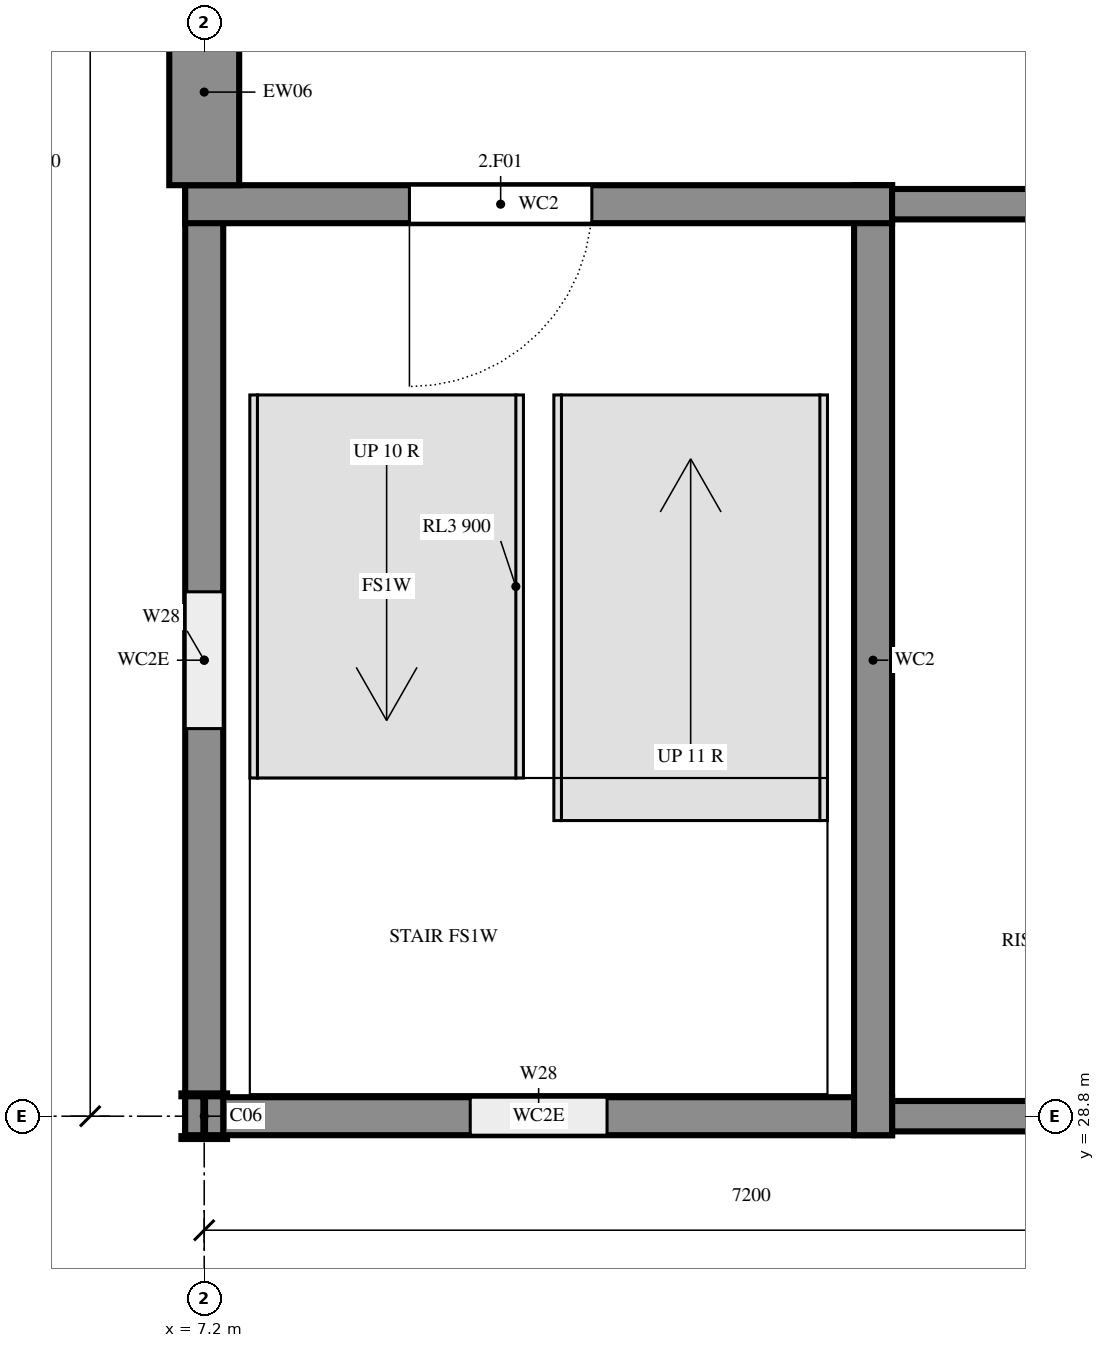
"""IFC4 building model, lengths in metres.
Left out: names, types, materials, properties, quantities, classifications, styles, units other than length and angle.
Written with IfcOpenShell. Run it as: python <this file> out.ifc"""

import sys

from ifc_helpers import new_model, si_unit, direction, frame, frame_2d, origin, origin_2d, place, context, subcontext, project, spatial, rectangle, i_section, extrude, element, fill, save


model = new_model("IFC4")
c1 = context("Model", 3, precision=1e-05, world=origin(), true_north=direction((0.0, 1.0)))
c2 = subcontext(c1, "Body", "Model", "MODEL_VIEW")
j1 = project(units=[si_unit("LENGTHUNIT", "METRE"), si_unit("PLANEANGLEUNIT", "RADIAN")], contexts=[c1])
p1 = place(None, origin())
s1 = spatial("IfcSite", under=j1, at=p1, CompositionType="ELEMENT")
p2 = place(p1, origin())
s2 = spatial("IfcBuilding", under=s1, at=p2, CompositionType="ELEMENT")
p3 = place(p2, frame((0.0, 0.0, 7.2)))
s3 = spatial("IfcBuildingStorey", under=s2, at=p3, CompositionType="ELEMENT", Elevation=7.2)
p4 = place(p3, frame((7.2, 28.8, 0.0), z_axis=(0.0, 0.0, 1.0), x_axis=(1.0, 0.0, 0.0)))
e1 = element("IfcColumn", 1, at=p4, inside=s3, PredefinedType="COLUMN", context=c2, shape_type="SweptSolid", body=[
    extrude(i_section(OverallWidth=0.3, OverallDepth=0.3, WebThickness=0.011, FlangeThickness=0.019, FilletRadius=0.027, at=origin_2d()), origin(), (0.0, 0.0, 1.0), 3.6),
])
p5 = place(p3, frame((7.075, 28.8, 0.0), z_axis=(0.0, 0.0, 1.0), x_axis=(1.0, 0.0, 0.0)))
e2 = element("IfcWall", 2, at=p5, inside=s3, PredefinedType="SHEAR", context=c2, shape_type="SweptSolid", body=[
    extrude(rectangle(XDim=4.65, YDim=0.25, at=frame_2d((2.325, 0.0))), origin(), (0.0, 0.0, 1.0), 3.6),
])
p6 = place(p5, frame((1.875, 0.0, 0.6)))
e3 = element("IfcOpeningElement", 3, at=p6, cuts=e2, PredefinedType="OPENING", context=c2, shape_type="SweptSolid", body=[
    extrude(rectangle(XDim=0.9, YDim=2.1, at=frame_2d((0.45, 1.05))), frame((0.0, 0.135, 0.0), z_axis=(0.0, -1.0, 0.0), x_axis=(1.0, 0.0, 0.0)), (0.0, 0.0, 1.0), 0.27),
])
p7 = place(p3, frame((11.725, 28.8, 0.0), z_axis=(0.0, 0.0, 1.0), x_axis=(1.0, 0.0, 0.0)))
e4 = element("IfcWall", 4, at=p7, inside=s3, PredefinedType="SHEAR", context=c2, shape_type="SweptSolid", body=[
    extrude(rectangle(XDim=2.775, YDim=0.2, at=frame_2d((1.387, 0.0))), origin(), (0.0, 0.0, 1.0), 3.6),
])
p8 = place(p3, frame((11.6, 28.675, 0.0), z_axis=(0.0, 0.0, 1.0), x_axis=(0.0, 1.0, 0.0)))
e5 = element("IfcWall", 5, at=p8, inside=s3, PredefinedType="SHEAR", context=c2, shape_type="SweptSolid", body=[
    extrude(rectangle(XDim=6.25, YDim=0.25, at=frame_2d((3.125, 0.0))), origin(), (0.0, 0.0, 1.0), 3.6),
])
p9 = place(p3, frame((7.2, 34.925, 0.0), z_axis=(0.0, 0.0, 1.0), x_axis=(0.0, -1.0, 0.0)))
e6 = element("IfcWall", 6, at=p9, inside=s3, PredefinedType="SHEAR", context=c2, shape_type="SweptSolid", body=[
    extrude(rectangle(XDim=6.25, YDim=0.25, at=frame_2d((3.125, 0.0))), origin(), (0.0, 0.0, 1.0), 3.6),
])
p10 = place(p9, frame((2.675, 0.0, 0.6)))
e7 = element("IfcOpeningElement", 7, at=p10, cuts=e6, PredefinedType="OPENING", context=c2, shape_type="SweptSolid", body=[
    extrude(rectangle(XDim=0.9, YDim=2.1, at=frame_2d((0.45, 1.05))), frame((0.0, 0.135, 0.0), z_axis=(0.0, -1.0, 0.0), x_axis=(1.0, 0.0, 0.0)), (0.0, 0.0, 1.0), 0.27),
])
p11 = place(p3, frame((11.725, 34.8, 0.0), z_axis=(0.0, 0.0, 1.0), x_axis=(-1.0, 0.0, 0.0)))
e8 = element("IfcWall", 8, at=p11, inside=s3, PredefinedType="SHEAR", context=c2, shape_type="SweptSolid", body=[
    extrude(rectangle(XDim=4.65, YDim=0.25, at=frame_2d((2.325, 0.0))), origin(), (0.0, 0.0, 1.0), 3.6),
])
p12 = place(p11, frame((1.975, 0.0, 0.0)))
e9 = element("IfcOpeningElement", 9, at=p12, cuts=e8, PredefinedType="OPENING", context=c2, shape_type="SweptSolid", body=[
    extrude(rectangle(XDim=1.2, YDim=2.4, at=frame_2d((0.6, 1.2))), frame((0.0, 0.135, 0.0), z_axis=(0.0, -1.0, 0.0), x_axis=(1.0, 0.0, 0.0)), (0.0, 0.0, 1.0), 0.27),
])
p13 = place(p3, frame((14.5, 34.8, 0.0), z_axis=(0.0, 0.0, 1.0), x_axis=(-1.0, 0.0, 0.0)))
e10 = element("IfcWall", 10, at=p13, inside=s3, PredefinedType="SHEAR", context=c2, shape_type="SweptSolid", body=[
    extrude(rectangle(XDim=2.775, YDim=0.2, at=frame_2d((1.387, 0.0))), origin(), (0.0, 0.0, 1.0), 3.6),
])
p14 = place(p3, frame((7.2, 36.15, 0.0), z_axis=(0.0, 0.0, 1.0), x_axis=(0.0, -1.0, 0.0)))
e11 = element("IfcWall", 11, at=p14, inside=s3, PredefinedType="SOLIDWALL", context=c2, shape_type="SweptSolid", body=[
    extrude(rectangle(XDim=1.225, YDim=0.46, at=frame_2d((0.612, 0.0))), origin(), (0.0, 0.0, 1.0), 3.22),
])
p15 = place(p6, origin())
e12 = element("IfcWindow", 12, at=p15, inside=s3, PartitioningType="SINGLE_PANEL", PredefinedType="WINDOW", context=c2, shape_type="SweptSolid", body=[
    extrude(rectangle(XDim=0.9, YDim=2.1, at=frame_2d((0.45, 1.05))), frame((0.0, 0.03, 0.0), z_axis=(0.0, -1.0, 0.0), x_axis=(1.0, 0.0, 0.0)), (0.0, 0.0, 1.0), 0.06),
])
fill(e3, e12)
p16 = place(p10, origin())
e13 = element("IfcWindow", 13, at=p16, inside=s3, PartitioningType="SINGLE_PANEL", PredefinedType="WINDOW", context=c2, shape_type="SweptSolid", body=[
    extrude(rectangle(XDim=0.9, YDim=2.1, at=frame_2d((0.45, 1.05))), frame((0.0, 0.03, 0.0), z_axis=(0.0, -1.0, 0.0), x_axis=(1.0, 0.0, 0.0)), (0.0, 0.0, 1.0), 0.06),
])
fill(e7, e13)
p17 = place(p12, origin())
e14 = element("IfcDoor", 14, at=p17, inside=s3, OperationType="SINGLE_SWING_LEFT", PredefinedType="DOOR", context=c2, shape_type="SweptSolid", body=[
    extrude(rectangle(XDim=1.2, YDim=2.4, at=frame_2d((0.6, 1.2))), frame((0.0, 0.025, 0.0), z_axis=(0.0, -1.0, 0.0), x_axis=(1.0, 0.0, 0.0)), (0.0, 0.0, 1.0), 0.05),
])
fill(e9, e14)
save(model, sys.argv[1])
